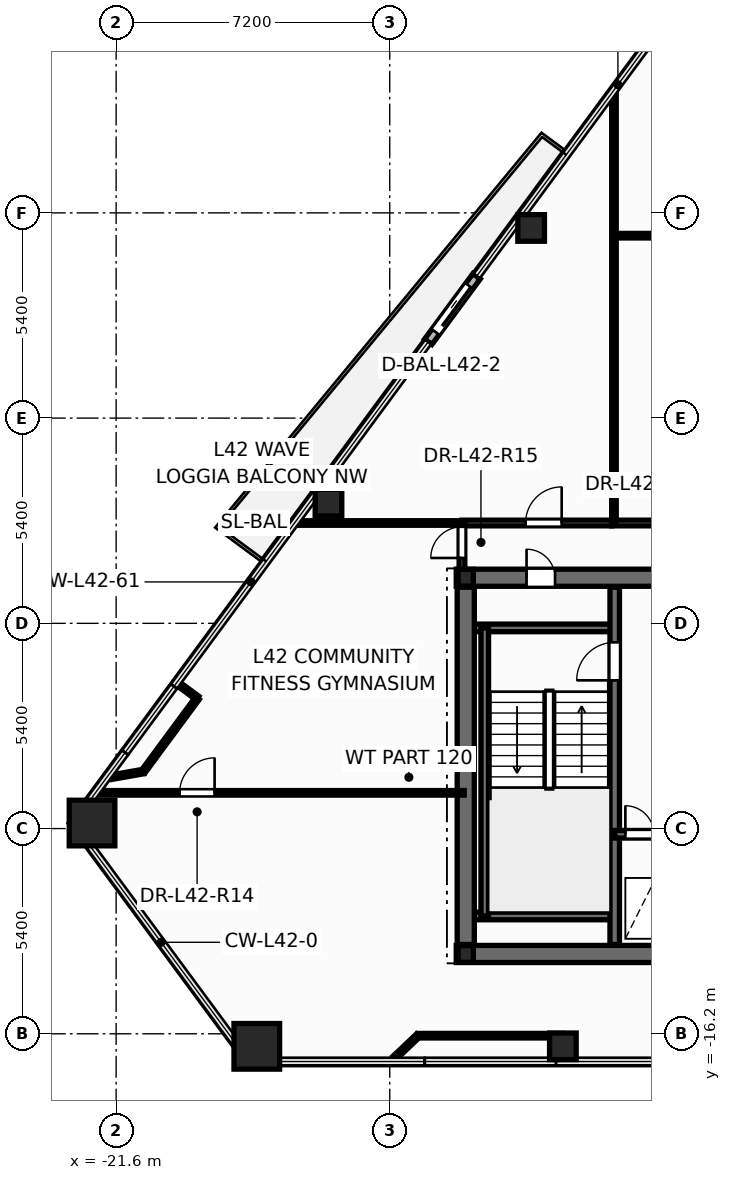
"""IFC4 building model, lengths in metres.
Left out: names, types, materials, properties, quantities, classifications, styles, units other than length and angle.
Written with IfcOpenShell. Run it as: python <this file> out.ifc"""

import sys

from ifc_helpers import new_model, si_unit, direction, frame, frame_2d, origin, origin_2d, place, context, subcontext, project, spatial, rectangle, hollow_rectangle, hollow_circle, i_section, extrude, element, fill, save


model = new_model("IFC4")
c1 = context("Model", 3, precision=1e-05, world=origin(), true_north=direction((0.0, 1.0)))
c2 = subcontext(c1, "Body", "Model", "MODEL_VIEW")
j1 = project(units=[si_unit("LENGTHUNIT", "METRE"), si_unit("PLANEANGLEUNIT", "RADIAN")], contexts=[c1])
p1 = place(None, origin())
s1 = spatial("IfcSite", under=j1, at=p1, CompositionType="ELEMENT")
p2 = place(p1, origin())
s2 = spatial("IfcBuilding", under=s1, at=p2, CompositionType="ELEMENT")
p3 = place(p2, frame((0.0, 0.0, 161.7)))
s3 = spatial("IfcBuildingStorey", under=s2, at=p3, CompositionType="ELEMENT", Elevation=161.7)
for number, where, z_axis, x_axis in (
    (1, (-22.234, -10.655, 0.0), (0.0, 0.0, 1.0), (1.0, 0.0, 0.0)),
    (2, (-17.898, -16.53, 0.0), (0.0, 0.0, 1.0), (1.0, 0.0, 0.0)),
):
    element("IfcColumn", number, at=place(p3, frame(where, z_axis=z_axis, x_axis=x_axis)), inside=s3, PredefinedType="COLUMN", context=c2, shape_type="SweptSolid", body=[
        extrude(hollow_rectangle(XDim=1.2, YDim=1.2, WallThickness=0.055, at=origin_2d()), origin(), (0.0, 0.0, 1.0), 3.6),
    ])
for number, where, z_axis, x_axis in (
    (3, (-9.844, -16.53, 0.0), (0.0, 0.0, 1.0), (1.0, 0.0, 0.0)),
    (4, (-10.679, 5.003, 0.0), (0.0, 0.0, 1.0), (1.0, 0.0, 0.0)),
    (5, (-16.012, -2.223, 0.0), (0.0, 0.0, 1.0), (1.0, 0.0, 0.0)),
):
    element("IfcColumn", number, at=place(p3, frame(where, z_axis=z_axis, x_axis=x_axis)), inside=s3, PredefinedType="COLUMN", context=c2, shape_type="SweptSolid", body=[
        extrude(hollow_circle(Radius=0.35, WallThickness=0.03, at=origin_2d()), origin(), (0.0, 0.0, 1.0), 3.6),
    ])
for number, where, z_axis, x_axis in (
    (6, (-12.4, -14.1, 0.0), (0.0, 0.0, 1.0), (1.0, 0.0, 0.0)),
    (7, (-12.4, -4.2, 0.0), (0.0, 0.0, 1.0), (1.0, 0.0, 0.0)),
):
    element("IfcColumn", number, at=place(p3, frame(where, z_axis=z_axis, x_axis=x_axis)), inside=s3, PredefinedType="COLUMN", context=c2, shape_type="SweptSolid", body=[
        extrude(i_section(OverallWidth=0.4, OverallDepth=0.44, WebThickness=0.028, FlangeThickness=0.04, at=origin_2d()), origin(), (0.0, 0.0, 1.0), 3.6),
    ])
p4 = place(p3, frame((-12.115, 3.731, -0.015), z_axis=(0.0, 0.0, 1.0), x_axis=(-0.593794270714, -0.804616905158, 0.0)))
e8 = element("IfcWall", 8, at=p4, inside=s3, PredefinedType="STANDARD", context=c2, shape_type="SweptSolid", body=[
    extrude(rectangle(XDim=2.14, YDim=0.24, at=frame_2d((1.07, 0.0))), origin(), (0.0, 0.0, 1.0), 2.807),
])
p5 = place(p4, frame((0.32, 0.0, 0.015)))
e9 = element("IfcOpeningElement", 9, at=p5, cuts=e8, PredefinedType="OPENING", context=c2, shape_type="SweptSolid", body=[
    extrude(rectangle(XDim=1.506, YDim=2.204, at=frame_2d((0.75, 1.102))), frame((0.0, 0.13, 0.0), z_axis=(0.0, -1.0, 0.0), x_axis=(1.0, 0.0, 0.0)), (0.0, 0.0, 1.0), 0.26),
])
p6 = place(p3, frame((-12.65, -14.1, 0.0), z_axis=(0.0, 0.0, 1.0), x_axis=(1.0, 0.0, 0.0)))
e10 = element("IfcWall", 10, at=p6, inside=s3, PredefinedType="SHEAR", context=c2, shape_type="SweptSolid", body=[
    extrude(rectangle(XDim=25.3, YDim=0.45, at=frame_2d((12.65, 0.0))), origin(), (0.0, 0.0, 1.0), 3.6),
])
p7 = place(p3, frame((-12.65, -4.2, 0.0), z_axis=(0.0, 0.0, 1.0), x_axis=(1.0, 0.0, 0.0)))
e11 = element("IfcWall", 11, at=p7, inside=s3, PredefinedType="SHEAR", context=c2, shape_type="SweptSolid", body=[
    extrude(rectangle(XDim=25.3, YDim=0.45, at=frame_2d((12.65, 0.0))), origin(), (0.0, 0.0, 1.0), 3.6),
])
p8 = place(p7, frame((1.85, 0.0, 0.0)))
e12 = element("IfcOpeningElement", 12, at=p8, cuts=e11, PredefinedType="OPENING", context=c2, shape_type="SweptSolid", body=[
    extrude(rectangle(XDim=0.756, YDim=2.054, at=frame_2d((0.375, 1.027))), frame((0.0, 0.235, 0.0), z_axis=(0.0, -1.0, 0.0), x_axis=(1.0, 0.0, 0.0)), (0.0, 0.0, 1.0), 0.47),
])
p9 = place(p7, frame((22.65, 0.0, 0.0)))
e13 = element("IfcOpeningElement", 13, at=p9, cuts=e11, PredefinedType="OPENING", context=c2, shape_type="SweptSolid", body=[
    extrude(rectangle(XDim=0.756, YDim=2.054, at=frame_2d((0.375, 1.027))), frame((0.0, 0.235, 0.0), z_axis=(0.0, -1.0, 0.0), x_axis=(1.0, 0.0, 0.0)), (0.0, 0.0, 1.0), 0.47),
])
p10 = place(p7, frame((5.85, 0.0, 0.0)))
e14 = element("IfcOpeningElement", 14, at=p10, cuts=e11, PredefinedType="OPENING", context=c2, shape_type="SweptSolid", body=[
    extrude(rectangle(XDim=1.006, YDim=2.104, at=frame_2d((0.5, 1.052))), frame((0.0, 0.235, 0.0), z_axis=(0.0, -1.0, 0.0), x_axis=(1.0, 0.0, 0.0)), (0.0, 0.0, 1.0), 0.47),
])
p11 = place(p7, frame((10.35, 0.0, 0.0)))
e15 = element("IfcOpeningElement", 15, at=p11, cuts=e11, PredefinedType="OPENING", context=c2, shape_type="SweptSolid", body=[
    extrude(rectangle(XDim=1.406, YDim=2.154, at=frame_2d((0.7, 1.077))), frame((0.0, 0.235, 0.0), z_axis=(0.0, -1.0, 0.0), x_axis=(1.0, 0.0, 0.0)), (0.0, 0.0, 1.0), 0.47),
])
p12 = place(p7, frame((18.45, 0.0, 0.0)))
e16 = element("IfcOpeningElement", 16, at=p12, cuts=e11, PredefinedType="OPENING", context=c2, shape_type="SweptSolid", body=[
    extrude(rectangle(XDim=1.006, YDim=2.104, at=frame_2d((0.5, 1.052))), frame((0.0, 0.235, 0.0), z_axis=(0.0, -1.0, 0.0), x_axis=(1.0, 0.0, 0.0)), (0.0, 0.0, 1.0), 0.47),
])
for number, where, z_axis, x_axis in (
    (17, (-12.35, -5.52, 0.0), (0.0, 0.0, 1.0), (1.0, 0.0, 0.0)),
    (18, (-12.35, -13.1, 0.0), (0.0, 0.0, 1.0), (1.0, 0.0, 0.0)),
):
    element("IfcWall", number, at=place(p3, frame(where, z_axis=z_axis, x_axis=x_axis)), inside=s3, PredefinedType="SOLIDWALL", context=c2, shape_type="SweptSolid", body=[
        extrude(rectangle(XDim=3.87, YDim=0.2, at=frame_2d((1.935, 0.0))), origin(), (0.0, 0.0, 1.0), 3.6),
    ])
p13 = place(p3, frame((-11.9, -13.1, 0.0), z_axis=(0.0, 0.0, 1.0), x_axis=(0.0, 1.0, 0.0)))
e19 = element("IfcWall", 19, at=p13, inside=s3, PredefinedType="SOLIDWALL", context=c2, shape_type="SweptSolid", body=[
    extrude(rectangle(XDim=7.58, YDim=0.2, at=frame_2d((3.79, 0.0))), origin(), (0.0, 0.0, 1.0), 3.6),
])
p14 = place(p3, frame((-8.48, -13.85, 0.0), z_axis=(0.0, 0.0, 1.0), x_axis=(0.0, 1.0, 0.0)))
e20 = element("IfcWall", 20, at=p14, inside=s3, PredefinedType="SHEAR", context=c2, shape_type="SweptSolid", body=[
    extrude(rectangle(XDim=9.4, YDim=0.25, at=frame_2d((4.7, 0.0))), origin(), (0.0, 0.0, 1.0), 3.6),
])
p15 = place(p14, frame((6.95, 0.0, 0.0)))
e21 = element("IfcOpeningElement", 21, at=p15, cuts=e20, PredefinedType="OPENING", context=c2, shape_type="SweptSolid", body=[
    extrude(rectangle(XDim=1.006, YDim=2.104, at=frame_2d((0.5, 1.052))), frame((0.0, 0.135, 0.0), z_axis=(0.0, -1.0, 0.0), x_axis=(1.0, 0.0, 0.0)), (0.0, 0.0, 1.0), 0.27),
])
p16 = place(p3, frame((-8.48, -10.95, 0.0), z_axis=(0.0, 0.0, 1.0), x_axis=(1.0, 0.0, 0.0)))
e22 = element("IfcWall", 22, at=p16, inside=s3, PredefinedType="SOLIDWALL", context=c2, shape_type="SweptSolid", body=[
    extrude(rectangle(XDim=3.36, YDim=0.2, at=frame_2d((1.68, 0.0))), origin(), (0.0, 0.0, 1.0), 3.6),
])
p17 = place(p16, frame((0.28, 0.0, 0.0)))
e23 = element("IfcOpeningElement", 23, at=p17, cuts=e22, PredefinedType="OPENING", context=c2, shape_type="SweptSolid", body=[
    extrude(rectangle(XDim=0.756, YDim=2.054, at=frame_2d((0.375, 1.027))), frame((0.0, 0.11, 0.0), z_axis=(0.0, -1.0, 0.0), x_axis=(1.0, 0.0, 0.0)), (0.0, 0.0, 1.0), 0.22),
])
p18 = place(p16, frame((1.85, 0.0, 0.0)))
e24 = element("IfcOpeningElement", 24, at=p18, cuts=e22, PredefinedType="OPENING", context=c2, shape_type="SweptSolid", body=[
    extrude(rectangle(XDim=1.106, YDim=2.104, at=frame_2d((0.55, 1.052))), frame((0.0, 0.11, 0.0), z_axis=(0.0, -1.0, 0.0), x_axis=(1.0, 0.0, 0.0)), (0.0, 0.0, 1.0), 0.22),
])
p19 = place(p3, frame((-12.4, -13.85, 0.0), z_axis=(0.0, 0.0, 1.0), x_axis=(0.0, 1.0, 0.0)))
e25 = element("IfcWall", 25, at=p19, inside=s3, PredefinedType="SHEAR", context=c2, shape_type="SweptSolid", body=[
    extrude(rectangle(XDim=9.4, YDim=0.45, at=frame_2d((4.7, 0.0))), origin(), (0.0, 0.0, 1.0), 3.6),
])
p20 = place(p3, frame((-22.145, -9.86, 0.0), z_axis=(0.0, 0.0, 1.0), x_axis=(1.0, 0.0, 0.0)))
e26 = element("IfcWall", 26, at=p20, inside=s3, PredefinedType="PARTITIONING", context=c2, shape_type="SweptSolid", body=[
    extrude(rectangle(XDim=9.705, YDim=0.12, at=frame_2d((4.853, 0.0))), origin(), (0.0, 0.0, 1.0), 2.325),
])
p21 = place(p20, frame((2.216, 0.0, 0.0)))
e27 = element("IfcOpeningElement", 27, at=p21, cuts=e26, PredefinedType="OPENING", context=c2, shape_type="SweptSolid", body=[
    extrude(rectangle(XDim=0.926, YDim=2.104, at=frame_2d((0.46, 1.052))), frame((0.0, 0.07, 0.0), z_axis=(0.0, -1.0, 0.0), x_axis=(1.0, 0.0, 0.0)), (0.0, 0.0, 1.0), 0.14),
])
p22 = place(p3, frame((-8.56, -2.76, 0.0), z_axis=(0.0, 0.0, 1.0), x_axis=(1.0, 0.0, 0.0)))
e28 = element("IfcWall", 28, at=p22, inside=s3, PredefinedType="PARTITIONING", context=c2, shape_type="SweptSolid", body=[
    extrude(rectangle(XDim=9.2, YDim=0.15, at=frame_2d((4.6, 0.0))), origin(), (0.0, 0.0, 1.0), 2.325),
])
p23 = place(p22, frame((2.91, 0.0, 0.0)))
e29 = element("IfcOpeningElement", 29, at=p23, cuts=e28, PredefinedType="OPENING", context=c2, shape_type="SweptSolid", body=[
    extrude(rectangle(XDim=0.956, YDim=2.104, at=frame_2d((0.475, 1.052))), frame((0.0, 0.085, 0.0), z_axis=(0.0, -1.0, 0.0), x_axis=(1.0, 0.0, 0.0)), (0.0, 0.0, 1.0), 0.17),
])
p24 = place(p3, frame((-8.5, 4.8, 0.0), z_axis=(0.0, 0.0, 1.0), x_axis=(1.0, 0.0, 0.0)))
e30 = element("IfcWall", 30, at=p24, inside=s3, PredefinedType="PARTITIONING", context=c2, shape_type="SweptSolid", body=[
    extrude(rectangle(XDim=9.14, YDim=0.12, at=frame_2d((4.57, 0.0))), origin(), (0.0, 0.0, 1.0), 2.325),
])
p25 = place(p3, frame((-8.5, -2.76, 0.0), z_axis=(0.0, 0.0, 1.0), x_axis=(0.0, 1.0, 0.0)))
e31 = element("IfcWall", 31, at=p25, inside=s3, PredefinedType="PARTITIONING", context=c2, shape_type="SweptSolid", body=[
    extrude(rectangle(XDim=11.39, YDim=0.12, at=frame_2d((5.695, 0.0))), origin(), (0.0, 0.0, 1.0), 2.617),
])
p26 = place(p3, frame((-16.905, -2.76, 0.0), z_axis=(0.0, 0.0, 1.0), x_axis=(1.0, 0.0, 0.0)))
e32 = element("IfcWall", 32, at=p26, inside=s3, PredefinedType="PARTITIONING", context=c2, shape_type="SweptSolid", body=[
    extrude(rectangle(XDim=4.465, YDim=0.12, at=frame_2d((2.233, 0.0))), origin(), (0.0, 0.0, 1.0), 2.792),
])
p27 = place(p3, frame((-12.5, -2.76, 0.0), z_axis=(0.0, 0.0, 1.0), x_axis=(1.0, 0.0, 0.0)))
e33 = element("IfcWall", 33, at=p27, inside=s3, PredefinedType="PARTITIONING", context=c2, shape_type="SweptSolid", body=[
    extrude(rectangle(XDim=3.938, YDim=0.15, at=frame_2d((1.969, 0.0))), origin(), (0.0, 0.0, 1.0), 3.35),
])
p28 = place(p27, frame((1.675, 0.0, 0.0)))
e34 = element("IfcOpeningElement", 34, at=p28, cuts=e33, PredefinedType="OPENING", context=c2, shape_type="SweptSolid", body=[
    extrude(rectangle(XDim=0.956, YDim=2.104, at=frame_2d((0.475, 1.052))), frame((0.0, 0.085, 0.0), z_axis=(0.0, -1.0, 0.0), x_axis=(1.0, 0.0, 0.0)), (0.0, 0.0, 1.0), 0.17),
])
p29 = place(p3, frame((-13.658, -16.25, 0.0), z_axis=(0.0, 0.0, 1.0), x_axis=(1.0, 0.0, 0.0)))
e35 = element("IfcWall", 35, at=p29, inside=s3, PredefinedType="PARTITIONING", context=c2, shape_type="SweptSolid", body=[
    extrude(rectangle(XDim=3.811, YDim=0.12, at=frame_2d((1.906, 0.0))), origin(), (0.0, 0.0, 1.0), 2.792),
])
p30 = place(p3, frame((-19.459, -7.366, 0.0), z_axis=(0.0, 0.0, 1.0), x_axis=(-0.593808475203, -0.804606422282, 0.0)))
e36 = element("IfcWall", 36, at=p30, inside=s3, PredefinedType="PARTITIONING", context=c2, shape_type="SweptSolid", body=[
    extrude(rectangle(XDim=2.404, YDim=0.12, at=frame_2d((1.202, 0.0))), origin(), (0.0, 0.0, 1.0), 3.35),
])
p31 = place(p3, frame((-12.5, -4.24, 0.0), z_axis=(0.0, 0.0, 1.0), x_axis=(0.0, 1.0, 0.0)))
e37 = element("IfcWall", 37, at=p31, inside=s3, PredefinedType="PARTITIONING", context=c2, shape_type="SweptSolid", body=[
    extrude(rectangle(XDim=1.48, YDim=0.15, at=frame_2d((0.74, 0.0))), origin(), (0.0, 0.0, 1.0), 2.325),
])
p32 = place(p31, frame((0.56, 0.0, 0.0)))
e38 = element("IfcOpeningElement", 38, at=p32, cuts=e37, PredefinedType="OPENING", context=c2, shape_type="SweptSolid", body=[
    extrude(rectangle(XDim=0.826, YDim=2.104, at=frame_2d((0.41, 1.052))), frame((0.0, 0.085, 0.0), z_axis=(0.0, -1.0, 0.0), x_axis=(1.0, 0.0, 0.0)), (0.0, 0.0, 1.0), 0.17),
])
for number, where, z_axis, x_axis in (
    (39, (-14.275, -16.834, 0.0), (0.0, 0.0, 1.0), (0.726, 0.687, 0.0)),
    (40, (-20.887, -9.3, 0.0), (0.0, 0.0, 1.0), (-0.985, -0.174, 0.0)),
):
    element("IfcWall", number, at=place(p3, frame(where, z_axis=z_axis, x_axis=x_axis)), inside=s3, PredefinedType="PARTITIONING", context=c2, shape_type="SweptSolid", body=[
        extrude(rectangle(XDim=0.85, YDim=0.12, at=frame_2d((0.425, 0.0))), origin(), (0.0, 0.0, 1.0), 2.792),
    ])
for number, where, z_axis, x_axis in (
    (41, (-19.998, -6.968, 0.0), (0.0, 0.0, 1.0), (0.805, -0.594, 0.0)),
    (42, (-9.846, -16.25, 0.0), (0.0, 0.0, 1.0), (0.0, -1.0, 0.0)),
):
    element("IfcWall", number, at=place(p3, frame(where, z_axis=z_axis, x_axis=x_axis)), inside=s3, PredefinedType="PARTITIONING", context=c2, shape_type="SweptSolid", body=[
        extrude(rectangle(XDim=0.67, YDim=0.12, at=frame_2d((0.335, 0.0))), origin(), (0.0, 0.0, 1.0), 2.792),
    ])
p33 = place(p5, origin())
e43 = element("IfcDoor", 43, at=p33, inside=s3, OperationType="SLIDING_TO_RIGHT", PredefinedType="DOOR", context=c2, shape_type="SweptSolid", body=[
    extrude(rectangle(XDim=1.5, YDim=2.2, at=frame_2d((0.75, 1.1))), frame((0.0, 0.025, 0.0), z_axis=(0.0, -1.0, 0.0), x_axis=(1.0, 0.0, 0.0)), (0.0, 0.0, 1.0), 0.05),
])
fill(e9, e43)
p34 = place(p15, origin())
e44 = element("IfcDoor", 44, at=p34, inside=s3, OperationType="SINGLE_SWING_LEFT", PredefinedType="DOOR", context=c2, shape_type="SweptSolid", body=[
    extrude(rectangle(XDim=1.0, YDim=2.1, at=frame_2d((0.5, 1.05))), frame((0.0, 0.025, 0.0), z_axis=(0.0, -1.0, 0.0), x_axis=(1.0, 0.0, 0.0)), (0.0, 0.0, 1.0), 0.05),
])
fill(e21, e44)
p35 = place(p17, origin())
e45 = element("IfcDoor", 45, at=p35, inside=s3, OperationType="SINGLE_SWING_LEFT", PredefinedType="DOOR", context=c2, shape_type="SweptSolid", body=[
    extrude(rectangle(XDim=0.75, YDim=2.05, at=frame_2d((0.375, 1.025))), frame((0.0, 0.025, 0.0), z_axis=(0.0, -1.0, 0.0), x_axis=(1.0, 0.0, 0.0)), (0.0, 0.0, 1.0), 0.05),
])
fill(e23, e45)
p36 = place(p8, origin())
e46 = element("IfcDoor", 46, at=p36, inside=s3, OperationType="SINGLE_SWING_LEFT", PredefinedType="DOOR", context=c2, shape_type="SweptSolid", body=[
    extrude(rectangle(XDim=0.75, YDim=2.05, at=frame_2d((0.375, 1.025))), frame((0.0, 0.025, 0.0), z_axis=(0.0, -1.0, 0.0), x_axis=(1.0, 0.0, 0.0)), (0.0, 0.0, 1.0), 0.05),
])
fill(e12, e46)
p37 = place(p28, origin())
e47 = element("IfcDoor", 47, at=p37, inside=s3, OperationType="SINGLE_SWING_RIGHT", PredefinedType="DOOR", context=c2, shape_type="SweptSolid", body=[
    extrude(rectangle(XDim=0.95, YDim=2.1, at=frame_2d((0.475, 1.05))), frame((0.0, 0.025, 0.0), z_axis=(0.0, -1.0, 0.0), x_axis=(1.0, 0.0, 0.0)), (0.0, 0.0, 1.0), 0.05),
])
fill(e34, e47)
p38 = place(p21, origin())
e48 = element("IfcDoor", 48, at=p38, inside=s3, OperationType="SINGLE_SWING_RIGHT", PredefinedType="DOOR", context=c2, shape_type="SweptSolid", body=[
    extrude(rectangle(XDim=0.92, YDim=2.1, at=frame_2d((0.46, 1.05))), frame((0.0, 0.025, 0.0), z_axis=(0.0, -1.0, 0.0), x_axis=(1.0, 0.0, 0.0)), (0.0, 0.0, 1.0), 0.05),
])
fill(e27, e48)
p39 = place(p32, origin())
e49 = element("IfcDoor", 49, at=p39, inside=s3, OperationType="SINGLE_SWING_LEFT", PredefinedType="DOOR", context=c2, shape_type="SweptSolid", body=[
    extrude(rectangle(XDim=0.82, YDim=2.1, at=frame_2d((0.41, 1.05))), frame((0.0, 0.025, 0.0), z_axis=(0.0, -1.0, 0.0), x_axis=(1.0, 0.0, 0.0)), (0.0, 0.0, 1.0), 0.05),
])
fill(e38, e49)
save(model, sys.argv[1])
